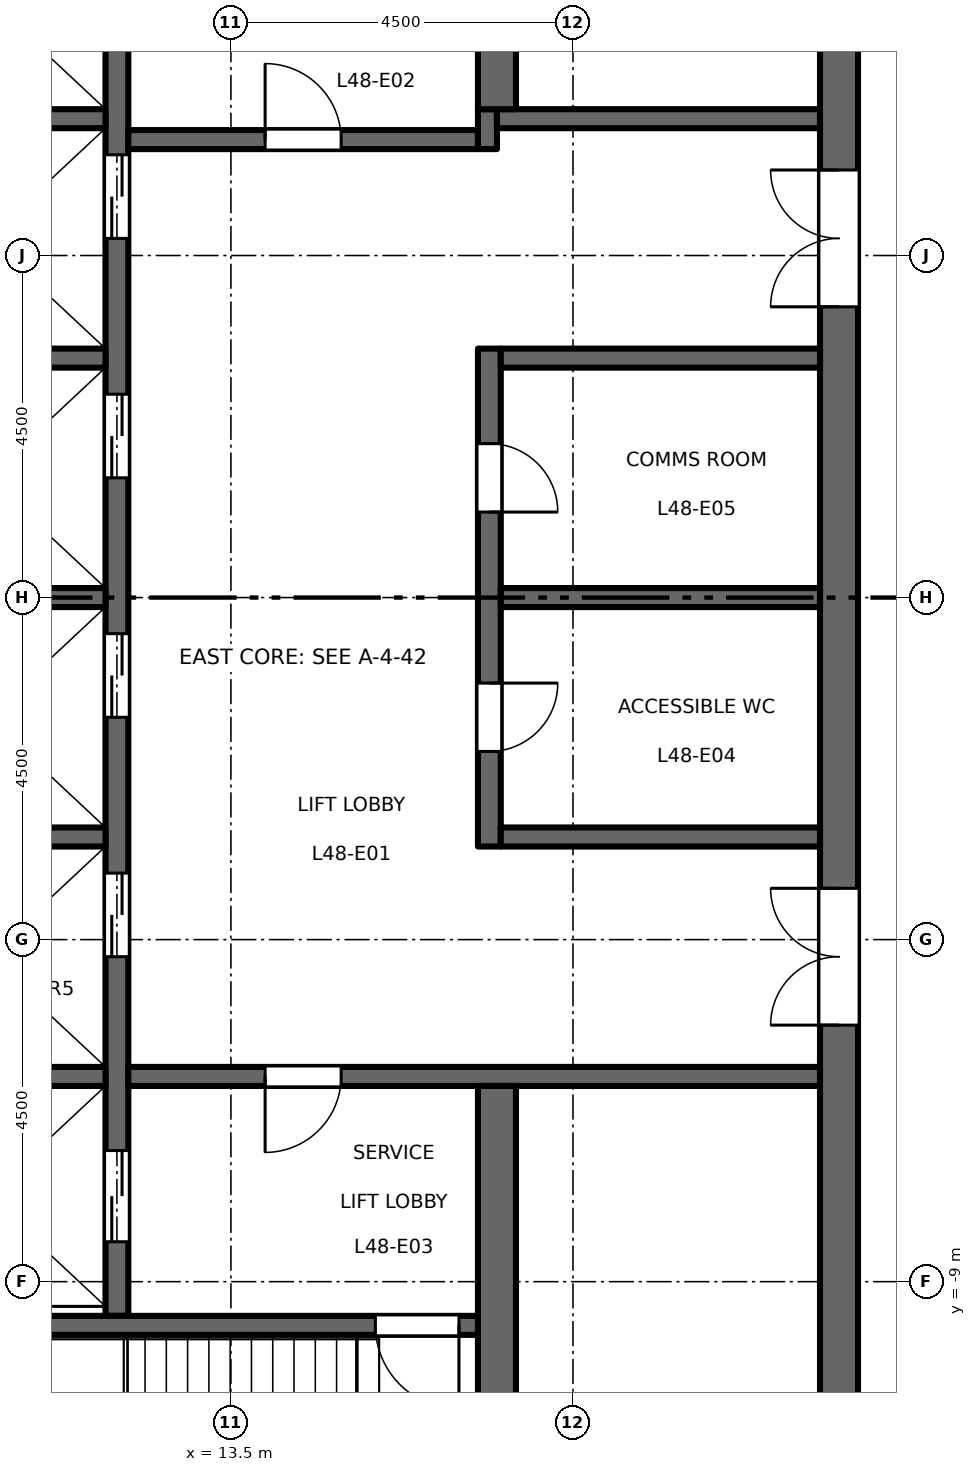
"""IFC4 building model, lengths in metres.
Left out: names, types, materials, properties, quantities, classifications, styles, units other than length and angle.
Written with IfcOpenShell. Run it as: python <this file> out.ifc"""

import sys

from ifc_helpers import new_model, si_unit, direction, frame, frame_2d, origin, place, context, subcontext, project, spatial, rectangle, extrude, element, fill, save


model = new_model("IFC4")
c1 = context("Model", 3, precision=1e-05, world=origin(), true_north=direction((0.0, 1.0)))
c2 = subcontext(c1, "Body", "Model", "MODEL_VIEW")
j1 = project(units=[si_unit("LENGTHUNIT", "METRE"), si_unit("PLANEANGLEUNIT", "RADIAN")], contexts=[c1])
p1 = place(None, origin())
s1 = spatial("IfcSite", under=j1, at=p1, CompositionType="ELEMENT")
p2 = place(p1, origin())
s2 = spatial("IfcBuilding", under=s1, at=p2, CompositionType="ELEMENT")
p3 = place(p2, frame((0.0, 0.0, 224.2)))
s3 = spatial("IfcBuildingStorey", under=s2, at=p3, CompositionType="ELEMENT", Elevation=224.2)
p4 = place(p3, frame((12.0, -9.45, 0.0), z_axis=(0.0, 0.0, 1.0), x_axis=(0.0, 1.0, 0.0)))
e1 = element("IfcWall", 1, at=p4, inside=s3, PredefinedType="SHEAR", context=c2, shape_type="SweptSolid", body=[
    extrude(rectangle(XDim=18.9, YDim=0.3, at=frame_2d((9.45, 0.0))), origin(), (0.0, 0.0, 1.0), 4.35),
])
p5 = place(p4, frame((4.725, 0.0, 0.0)))
e2 = element("IfcOpeningElement", 2, at=p5, cuts=e1, PredefinedType="OPENING", context=c2, shape_type="SweptSolid", body=[
    extrude(rectangle(XDim=1.1, YDim=2.1, at=frame_2d((0.55, 1.05))), frame((0.0, 0.16, 0.0), z_axis=(0.0, -1.0, 0.0), x_axis=(1.0, 0.0, 0.0)), (0.0, 0.0, 1.0), 0.32),
])
p6 = place(p4, frame((7.875, 0.0, 0.0)))
e3 = element("IfcOpeningElement", 3, at=p6, cuts=e1, PredefinedType="OPENING", context=c2, shape_type="SweptSolid", body=[
    extrude(rectangle(XDim=1.1, YDim=2.1, at=frame_2d((0.55, 1.05))), frame((0.0, 0.16, 0.0), z_axis=(0.0, -1.0, 0.0), x_axis=(1.0, 0.0, 0.0)), (0.0, 0.0, 1.0), 0.32),
])
p7 = place(p4, frame((11.025, 0.0, 0.0)))
e4 = element("IfcOpeningElement", 4, at=p7, cuts=e1, PredefinedType="OPENING", context=c2, shape_type="SweptSolid", body=[
    extrude(rectangle(XDim=1.1, YDim=2.1, at=frame_2d((0.55, 1.05))), frame((0.0, 0.16, 0.0), z_axis=(0.0, -1.0, 0.0), x_axis=(1.0, 0.0, 0.0)), (0.0, 0.0, 1.0), 0.32),
])
p8 = place(p4, frame((14.175, 0.0, 0.0)))
e5 = element("IfcOpeningElement", 5, at=p8, cuts=e1, PredefinedType="OPENING", context=c2, shape_type="SweptSolid", body=[
    extrude(rectangle(XDim=1.1, YDim=2.1, at=frame_2d((0.55, 1.05))), frame((0.0, 0.16, 0.0), z_axis=(0.0, -1.0, 0.0), x_axis=(1.0, 0.0, 0.0)), (0.0, 0.0, 1.0), 0.32),
])
p9 = place(p4, frame((16.725, 0.0, 0.0)))
e6 = element("IfcOpeningElement", 6, at=p9, cuts=e1, PredefinedType="OPENING", context=c2, shape_type="SweptSolid", body=[
    extrude(rectangle(XDim=1.2, YDim=2.1, at=frame_2d((0.6, 1.05))), frame((0.0, 0.16, 0.0), z_axis=(0.0, -1.0, 0.0), x_axis=(1.0, 0.0, 0.0)), (0.0, 0.0, 1.0), 0.32),
])
p10 = place(p4, frame((0.975, 0.0, 0.0)))
e7 = element("IfcOpeningElement", 7, at=p10, cuts=e1, PredefinedType="OPENING", context=c2, shape_type="SweptSolid", body=[
    extrude(rectangle(XDim=1.2, YDim=2.1, at=frame_2d((0.6, 1.05))), frame((0.0, 0.16, 0.0), z_axis=(0.0, -1.0, 0.0), x_axis=(1.0, 0.0, 0.0)), (0.0, 0.0, 1.0), 0.32),
])
p11 = place(p3, frame((12.15, 6.025, 0.0), z_axis=(0.0, 0.0, 1.0), x_axis=(1.0, 0.0, 0.0)))
e8 = element("IfcWall", 8, at=p11, inside=s3, PredefinedType="SHEAR", context=c2, shape_type="SweptSolid", body=[
    extrude(rectangle(XDim=4.6, YDim=0.25, at=frame_2d((2.3, 0.0))), origin(), (0.0, 0.0, 1.0), 4.35),
])
p12 = place(p11, frame((1.8, 0.0, 0.0)))
e9 = element("IfcOpeningElement", 9, at=p12, cuts=e8, PredefinedType="OPENING", context=c2, shape_type="SweptSolid", body=[
    extrude(rectangle(XDim=1.0, YDim=2.1, at=frame_2d((0.5, 1.05))), frame((0.0, 0.135, 0.0), z_axis=(0.0, -1.0, 0.0), x_axis=(1.0, 0.0, 0.0)), (0.0, 0.0, 1.0), 0.27),
])
p13 = place(p3, frame((16.875, 5.9, 0.0), z_axis=(0.0, 0.0, 1.0), x_axis=(0.0, 1.0, 0.0)))
e10 = element("IfcWall", 10, at=p13, inside=s3, PredefinedType="SHEAR", context=c2, shape_type="SweptSolid", body=[
    extrude(rectangle(XDim=0.525, YDim=0.25, at=frame_2d((0.263, 0.0))), origin(), (0.0, 0.0, 1.0), 4.35),
])
p14 = place(p3, frame((17.0, 6.3, 0.0), z_axis=(0.0, 0.0, 1.0), x_axis=(1.0, 0.0, 0.0)))
e11 = element("IfcWall", 11, at=p14, inside=s3, PredefinedType="SHEAR", context=c2, shape_type="SweptSolid", body=[
    extrude(rectangle(XDim=4.25, YDim=0.25, at=frame_2d((2.125, 0.0))), origin(), (0.0, 0.0, 1.0), 4.35),
])
p15 = place(p3, frame((12.15, -6.3, 0.0), z_axis=(0.0, 0.0, 1.0), x_axis=(1.0, 0.0, 0.0)))
e12 = element("IfcWall", 12, at=p15, inside=s3, PredefinedType="SHEAR", context=c2, shape_type="SweptSolid", body=[
    extrude(rectangle(XDim=9.1, YDim=0.25, at=frame_2d((4.55, 0.0))), origin(), (0.0, 0.0, 1.0), 4.35),
])
p16 = place(p15, frame((1.8, 0.0, 0.0)))
e13 = element("IfcOpeningElement", 13, at=p16, cuts=e12, PredefinedType="OPENING", context=c2, shape_type="SweptSolid", body=[
    extrude(rectangle(XDim=1.0, YDim=2.1, at=frame_2d((0.5, 1.05))), frame((0.0, 0.135, 0.0), z_axis=(0.0, -1.0, 0.0), x_axis=(1.0, 0.0, 0.0)), (0.0, 0.0, 1.0), 0.27),
])
p17 = place(p3, frame((21.5, -13.0, 0.0), z_axis=(0.0, 0.0, 1.0), x_axis=(0.0, 1.0, 0.0)))
e14 = element("IfcWall", 14, at=p17, inside=s3, PredefinedType="SHEAR", context=c2, shape_type="SweptSolid", body=[
    extrude(rectangle(XDim=26.0, YDim=0.5, at=frame_2d((13.0, 0.0))), origin(), (0.0, 0.0, 1.0), 4.35),
])
p18 = place(p17, frame((16.825, 0.0, 0.0)))
e15 = element("IfcOpeningElement", 15, at=p18, cuts=e14, PredefinedType="OPENING", context=c2, shape_type="SweptSolid", body=[
    extrude(rectangle(XDim=1.8, YDim=2.1, at=frame_2d((0.9, 1.05))), frame((0.0, 0.26, 0.0), z_axis=(0.0, -1.0, 0.0), x_axis=(1.0, 0.0, 0.0)), (0.0, 0.0, 1.0), 0.52),
])
p19 = place(p17, frame((7.375, 0.0, 0.0)))
e16 = element("IfcOpeningElement", 16, at=p19, cuts=e14, PredefinedType="OPENING", context=c2, shape_type="SweptSolid", body=[
    extrude(rectangle(XDim=1.8, YDim=2.1, at=frame_2d((0.9, 1.05))), frame((0.0, 0.26, 0.0), z_axis=(0.0, -1.0, 0.0), x_axis=(1.0, 0.0, 0.0)), (0.0, 0.0, 1.0), 0.52),
])
p20 = place(p3, frame((16.9, -3.275, 0.0), z_axis=(0.0, 0.0, 1.0), x_axis=(0.0, 1.0, 0.0)))
e17 = element("IfcWall", 17, at=p20, inside=s3, PredefinedType="SHEAR", context=c2, shape_type="SweptSolid", body=[
    extrude(rectangle(XDim=6.55, YDim=0.3, at=frame_2d((3.275, 0.0))), origin(), (0.0, 0.0, 1.0), 4.35),
])
p21 = place(p20, frame((1.25, 0.0, 0.0)))
e18 = element("IfcOpeningElement", 18, at=p21, cuts=e17, PredefinedType="OPENING", context=c2, shape_type="SweptSolid", body=[
    extrude(rectangle(XDim=0.9, YDim=2.1, at=frame_2d((0.45, 1.05))), frame((0.0, 0.16, 0.0), z_axis=(0.0, -1.0, 0.0), x_axis=(1.0, 0.0, 0.0)), (0.0, 0.0, 1.0), 0.32),
])
p22 = place(p20, frame((4.4, 0.0, 0.0)))
e19 = element("IfcOpeningElement", 19, at=p22, cuts=e17, PredefinedType="OPENING", context=c2, shape_type="SweptSolid", body=[
    extrude(rectangle(XDim=0.9, YDim=2.1, at=frame_2d((0.45, 1.05))), frame((0.0, 0.16, 0.0), z_axis=(0.0, -1.0, 0.0), x_axis=(1.0, 0.0, 0.0)), (0.0, 0.0, 1.0), 0.32),
])
for number, where, z_axis, x_axis in (
    (20, (17.05, 0.0, 0.0), (0.0, 0.0, 1.0), (1.0, 0.0, 0.0)),
    (21, (17.05, 3.15, 0.0), (0.0, 0.0, 1.0), (1.0, 0.0, 0.0)),
    (22, (17.05, -3.15, 0.0), (0.0, 0.0, 1.0), (1.0, 0.0, 0.0)),
):
    element("IfcWall", number, at=place(p3, frame(where, z_axis=z_axis, x_axis=x_axis)), inside=s3, PredefinedType="SHEAR", context=c2, shape_type="SweptSolid", body=[
        extrude(rectangle(XDim=4.2, YDim=0.25, at=frame_2d((2.1, 0.0))), origin(), (0.0, 0.0, 1.0), 4.35),
    ])
for number, where, z_axis, x_axis in (
    (23, (17.0, 6.425, 0.0), (0.0, 0.0, 1.0), (0.0, 1.0, 0.0)),
    (24, (17.0, -13.0, 0.0), (0.0, 0.0, 1.0), (0.0, 1.0, 0.0)),
):
    element("IfcWall", number, at=place(p3, frame(where, z_axis=z_axis, x_axis=x_axis)), inside=s3, PredefinedType="SHEAR", context=c2, shape_type="SweptSolid", body=[
        extrude(rectangle(XDim=6.575, YDim=0.5, at=frame_2d((3.288, 0.0))), origin(), (0.0, 0.0, 1.0), 4.35),
    ])
for number, where, z_axis, x_axis in (
    (25, (8.75, 0.0, 0.0), (0.0, 0.0, 1.0), (1.0, 0.0, 0.0)),
    (26, (8.75, 3.15, 0.0), (0.0, 0.0, 1.0), (1.0, 0.0, 0.0)),
    (27, (8.75, 6.3, 0.0), (0.0, 0.0, 1.0), (1.0, 0.0, 0.0)),
    (28, (8.75, -3.15, 0.0), (0.0, 0.0, 1.0), (1.0, 0.0, 0.0)),
    (29, (8.75, -6.3, 0.0), (0.0, 0.0, 1.0), (1.0, 0.0, 0.0)),
):
    element("IfcWall", number, at=place(p3, frame(where, z_axis=z_axis, x_axis=x_axis)), inside=s3, PredefinedType="SHEAR", context=c2, shape_type="SweptSolid", body=[
        extrude(rectangle(XDim=3.1, YDim=0.25, at=frame_2d((1.55, 0.0))), origin(), (0.0, 0.0, 1.0), 4.35),
    ])
p23 = place(p3, frame((8.75, -9.575, 0.0), z_axis=(0.0, 0.0, 1.0), x_axis=(1.0, 0.0, 0.0)))
e30 = element("IfcWall", 30, at=p23, inside=s3, PredefinedType="SHEAR", context=c2, shape_type="SweptSolid", body=[
    extrude(rectangle(XDim=8.0, YDim=0.25, at=frame_2d((4.0, 0.0))), origin(), (0.0, 0.0, 1.0), 4.35),
])
p24 = place(p23, frame((6.65, 0.0, 0.0)))
e31 = element("IfcOpeningElement", 31, at=p24, cuts=e30, PredefinedType="OPENING", context=c2, shape_type="SweptSolid", body=[
    extrude(rectangle(XDim=1.1, YDim=2.1, at=frame_2d((0.55, 1.05))), frame((0.0, 0.135, 0.0), z_axis=(0.0, -1.0, 0.0), x_axis=(1.0, 0.0, 0.0)), (0.0, 0.0, 1.0), 0.27),
])
p25 = place(p12, origin())
e32 = element("IfcDoor", 32, at=p25, inside=s3, OperationType="SINGLE_SWING_RIGHT", PredefinedType="DOOR", context=c2, shape_type="SweptSolid", body=[
    extrude(rectangle(XDim=1.0, YDim=2.1, at=frame_2d((0.5, 1.05))), frame((0.0, 0.025, 0.0), z_axis=(0.0, -1.0, 0.0), x_axis=(1.0, 0.0, 0.0)), (0.0, 0.0, 1.0), 0.05),
])
fill(e9, e32)
p26 = place(p16, origin())
e33 = element("IfcDoor", 33, at=p26, inside=s3, OperationType="SINGLE_SWING_LEFT", PredefinedType="DOOR", context=c2, shape_type="SweptSolid", body=[
    extrude(rectangle(XDim=1.0, YDim=2.1, at=frame_2d((0.5, 1.05))), frame((0.0, 0.025, 0.0), z_axis=(0.0, -1.0, 0.0), x_axis=(1.0, 0.0, 0.0)), (0.0, 0.0, 1.0), 0.05),
])
fill(e13, e33)
p27 = place(p24, origin())
e34 = element("IfcDoor", 34, at=p27, inside=s3, OperationType="SINGLE_SWING_RIGHT", PredefinedType="DOOR", context=c2, shape_type="SweptSolid", body=[
    extrude(rectangle(XDim=1.1, YDim=2.1, at=frame_2d((0.55, 1.05))), frame((0.0, 0.025, 0.0), z_axis=(0.0, -1.0, 0.0), x_axis=(1.0, 0.0, 0.0)), (0.0, 0.0, 1.0), 0.05),
])
fill(e31, e34)
p28 = place(p18, origin())
e35 = element("IfcDoor", 35, at=p28, inside=s3, OperationType="DOUBLE_DOOR_DOUBLE_SWING", PredefinedType="DOOR", context=c2, shape_type="SweptSolid", body=[
    extrude(rectangle(XDim=1.8, YDim=2.1, at=frame_2d((0.9, 1.05))), frame((0.0, 0.025, 0.0), z_axis=(0.0, -1.0, 0.0), x_axis=(1.0, 0.0, 0.0)), (0.0, 0.0, 1.0), 0.05),
])
fill(e15, e35)
p29 = place(p19, origin())
e36 = element("IfcDoor", 36, at=p29, inside=s3, OperationType="DOUBLE_DOOR_DOUBLE_SWING", PredefinedType="DOOR", context=c2, shape_type="SweptSolid", body=[
    extrude(rectangle(XDim=1.8, YDim=2.1, at=frame_2d((0.9, 1.05))), frame((0.0, 0.025, 0.0), z_axis=(0.0, -1.0, 0.0), x_axis=(1.0, 0.0, 0.0)), (0.0, 0.0, 1.0), 0.05),
])
fill(e16, e36)
p30 = place(p5, origin())
e37 = element("IfcDoor", 37, at=p30, inside=s3, OperationType="DOUBLE_DOOR_SLIDING", PredefinedType="DOOR", context=c2, shape_type="SweptSolid", body=[
    extrude(rectangle(XDim=1.1, YDim=2.1, at=frame_2d((0.55, 1.05))), frame((0.0, 0.025, 0.0), z_axis=(0.0, -1.0, 0.0), x_axis=(1.0, 0.0, 0.0)), (0.0, 0.0, 1.0), 0.05),
])
fill(e2, e37)
p31 = place(p6, origin())
e38 = element("IfcDoor", 38, at=p31, inside=s3, OperationType="DOUBLE_DOOR_SLIDING", PredefinedType="DOOR", context=c2, shape_type="SweptSolid", body=[
    extrude(rectangle(XDim=1.1, YDim=2.1, at=frame_2d((0.55, 1.05))), frame((0.0, 0.025, 0.0), z_axis=(0.0, -1.0, 0.0), x_axis=(1.0, 0.0, 0.0)), (0.0, 0.0, 1.0), 0.05),
])
fill(e3, e38)
p32 = place(p7, origin())
e39 = element("IfcDoor", 39, at=p32, inside=s3, OperationType="DOUBLE_DOOR_SLIDING", PredefinedType="DOOR", context=c2, shape_type="SweptSolid", body=[
    extrude(rectangle(XDim=1.1, YDim=2.1, at=frame_2d((0.55, 1.05))), frame((0.0, 0.025, 0.0), z_axis=(0.0, -1.0, 0.0), x_axis=(1.0, 0.0, 0.0)), (0.0, 0.0, 1.0), 0.05),
])
fill(e4, e39)
p33 = place(p8, origin())
e40 = element("IfcDoor", 40, at=p33, inside=s3, OperationType="DOUBLE_DOOR_SLIDING", PredefinedType="DOOR", context=c2, shape_type="SweptSolid", body=[
    extrude(rectangle(XDim=1.1, YDim=2.1, at=frame_2d((0.55, 1.05))), frame((0.0, 0.025, 0.0), z_axis=(0.0, -1.0, 0.0), x_axis=(1.0, 0.0, 0.0)), (0.0, 0.0, 1.0), 0.05),
])
fill(e5, e40)
p34 = place(p10, origin())
e41 = element("IfcDoor", 41, at=p34, inside=s3, OperationType="DOUBLE_DOOR_SLIDING", PredefinedType="DOOR", context=c2, shape_type="SweptSolid", body=[
    extrude(rectangle(XDim=1.2, YDim=2.1, at=frame_2d((0.6, 1.05))), frame((0.0, 0.025, 0.0), z_axis=(0.0, -1.0, 0.0), x_axis=(1.0, 0.0, 0.0)), (0.0, 0.0, 1.0), 0.05),
])
fill(e7, e41)
p35 = place(p21, origin())
e42 = element("IfcDoor", 42, at=p35, inside=s3, OperationType="SINGLE_SWING_RIGHT", PredefinedType="DOOR", context=c2, shape_type="SweptSolid", body=[
    extrude(rectangle(XDim=0.9, YDim=2.1, at=frame_2d((0.45, 1.05))), frame((0.0, 0.025, 0.0), z_axis=(0.0, -1.0, 0.0), x_axis=(1.0, 0.0, 0.0)), (0.0, 0.0, 1.0), 0.05),
])
fill(e18, e42)
p36 = place(p22, origin())
e43 = element("IfcDoor", 43, at=p36, inside=s3, OperationType="SINGLE_SWING_LEFT", PredefinedType="DOOR", context=c2, shape_type="SweptSolid", body=[
    extrude(rectangle(XDim=0.9, YDim=2.1, at=frame_2d((0.45, 1.05))), frame((0.0, 0.025, 0.0), z_axis=(0.0, -1.0, 0.0), x_axis=(1.0, 0.0, 0.0)), (0.0, 0.0, 1.0), 0.05),
])
fill(e19, e43)
save(model, sys.argv[1])
